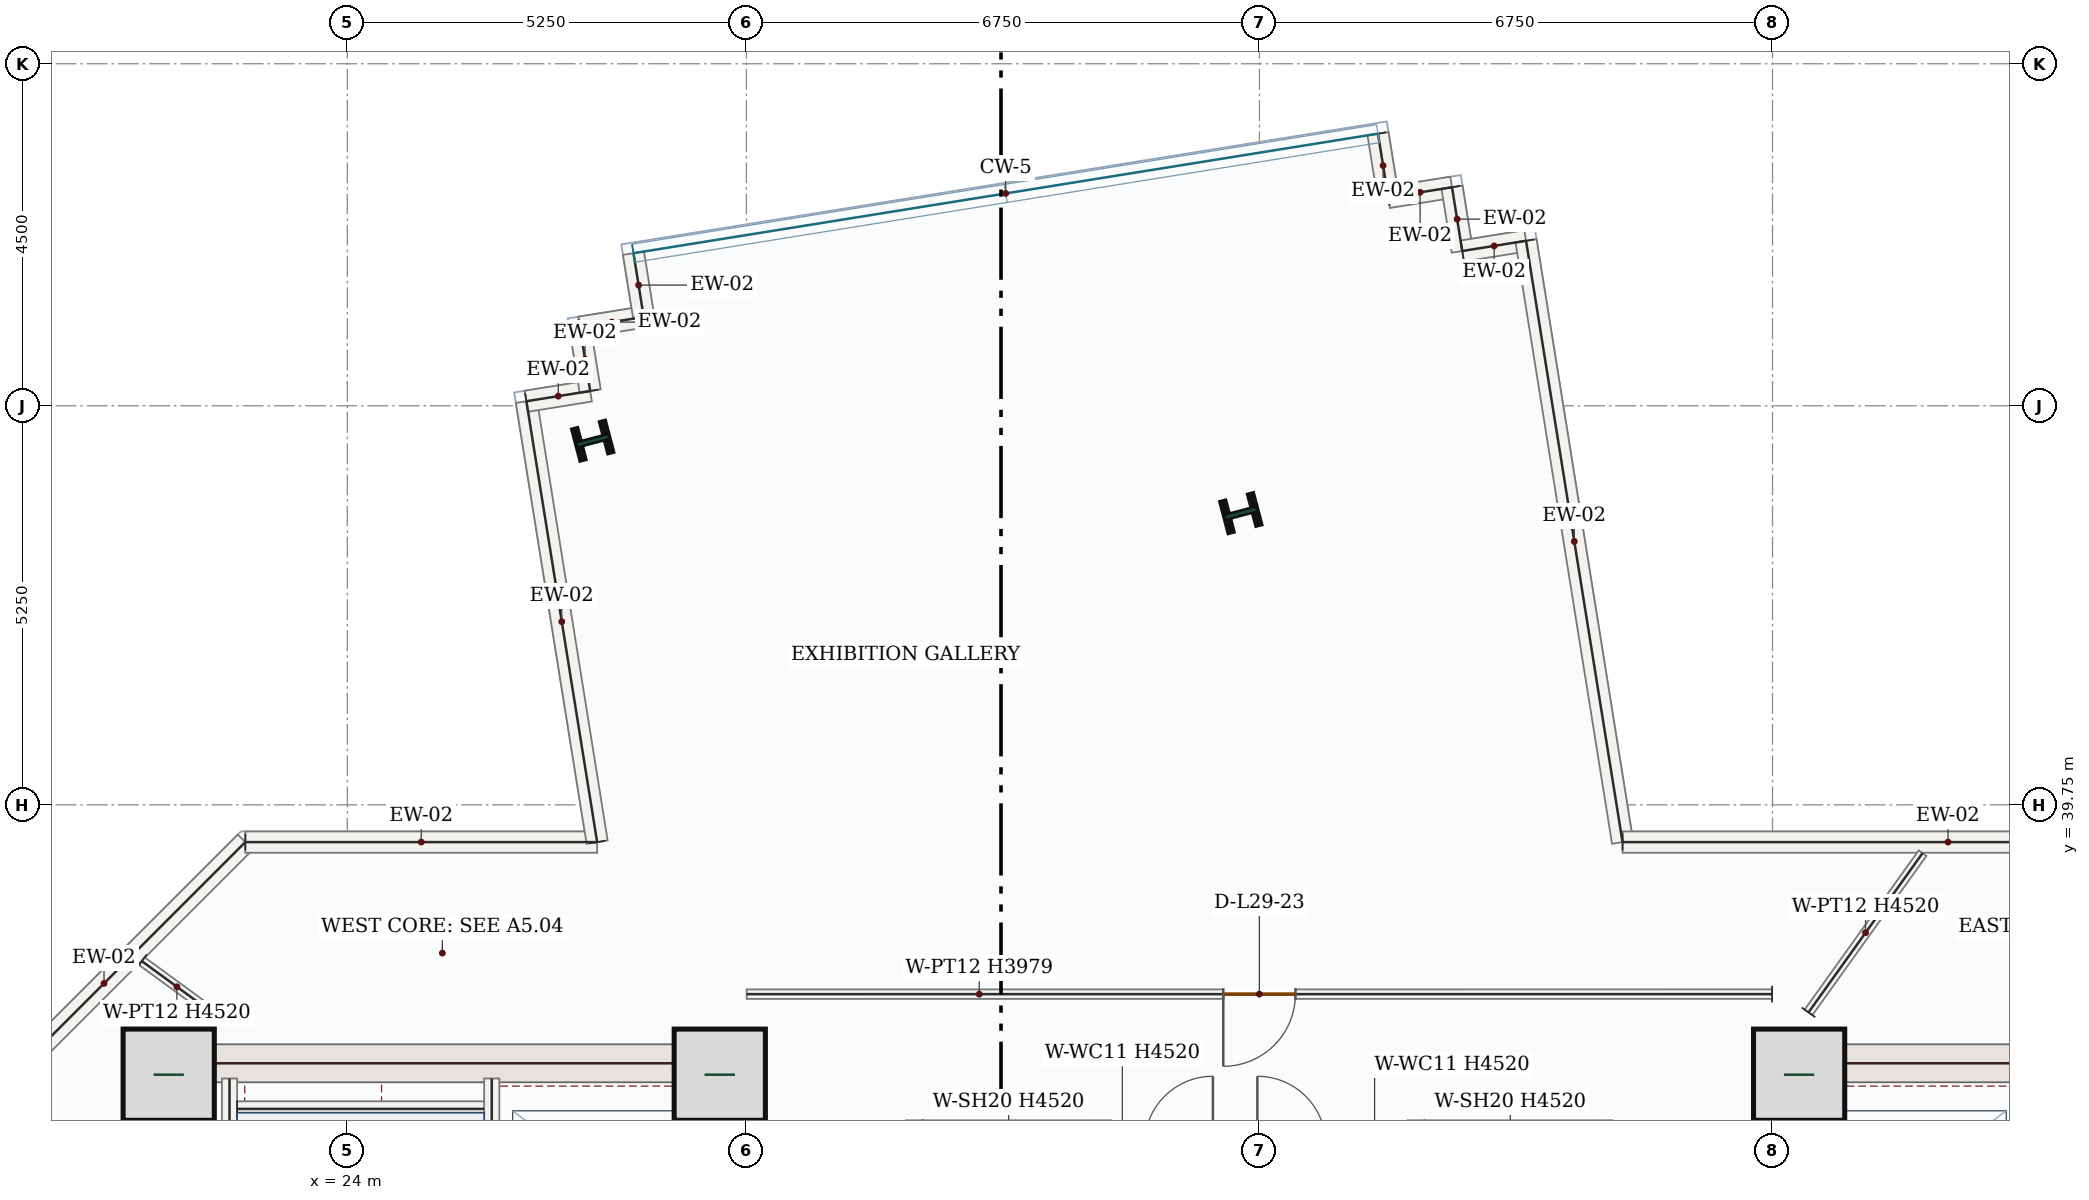
"""IFC4 building model, lengths in metres.
Left out: names, types, materials, properties, quantities, classifications, styles, units other than length and angle.
Written with IfcOpenShell. Run it as: python <this file> out.ifc"""

import sys

from ifc_helpers import new_model, si_unit, direction, frame, frame_2d, origin, origin_2d, place, context, subcontext, project, spatial, rectangle, i_section, extrude, source, transform, mapped, element, fill, save


model = new_model("IFC4")
c1 = context("Model", 3, precision=1e-05, world=origin(), true_north=direction((0.0, 1.0)))
c2 = subcontext(c1, "Body", "Model", "MODEL_VIEW")
j1 = project(units=[si_unit("LENGTHUNIT", "METRE"), si_unit("PLANEANGLEUNIT", "RADIAN")], contexts=[c1])
p1 = place(None, origin())
s1 = spatial("IfcSite", under=j1, at=p1, CompositionType="ELEMENT")
p2 = place(p1, origin())
s2 = spatial("IfcBuilding", under=s1, at=p2, CompositionType="ELEMENT")
p3 = place(p2, frame((0.0, 0.0, 130.8)))
s3 = spatial("IfcBuildingStorey", under=s2, at=p3, CompositionType="ELEMENT", Elevation=130.8)
m1 = source(origin(), c2, "Body", "SweptSolid", [
    extrude(rectangle(XDim=8.55, YDim=0.5, at=frame_2d((4.275, 0.0))), origin(), (0.0, 0.0, 1.0), 4.52),
])
p4 = place(p3, frame((21.5, 28.05, 0.0), z_axis=(0.0, 0.0, 1.0), x_axis=(0.0, 1.0, 0.0)))
e1 = element("IfcWall", 1, at=p4, inside=s3, PredefinedType="SHEAR", context=c2, shape_type="MappedRepresentation", body=[
    mapped(m1, transform((0.0, 0.0, 0.0), x_axis=(1.0, 0.0, 0.0), y_axis=(0.0, 1.0, 0.0), z_axis=(0.0, 0.0, 1.0), scale=1.0)),
])
p5 = place(p3, frame((29.0, 28.05, 0.0), z_axis=(0.0, 0.0, 1.0), x_axis=(0.0, 1.0, 0.0)))
e2 = element("IfcWall", 2, at=p5, inside=s3, PredefinedType="SHEAR", context=c2, shape_type="SweptSolid", body=[
    extrude(rectangle(XDim=8.55, YDim=0.5, at=frame_2d((4.275, 0.0))), origin(), (0.0, 0.0, 1.0), 4.52),
])
p6 = place(p5, frame((1.5, 0.0, 0.0)))
e3 = element("IfcOpeningElement", 3, at=p6, cuts=e2, PredefinedType="OPENING", context=c2, shape_type="SweptSolid", body=[
    extrude(rectangle(XDim=1.1, YDim=2.2, at=frame_2d((0.55, 1.1))), frame((0.0, 0.26, 0.0), z_axis=(0.0, -1.0, 0.0), x_axis=(1.0, 0.0, 0.0)), (0.0, 0.0, 1.0), 0.52),
])
m2 = source(origin(), c2, "Body", "SweptSolid", [
    extrude(rectangle(XDim=7.0, YDim=0.5, at=frame_2d((3.5, 0.0))), origin(), (0.0, 0.0, 1.0), 4.52),
])
p7 = place(p3, frame((21.75, 36.35, 0.0), z_axis=(0.0, 0.0, 1.0), x_axis=(1.0, 0.0, 0.0)))
e4 = element("IfcWall", 4, at=p7, inside=s3, PredefinedType="SHEAR", context=c2, shape_type="MappedRepresentation", body=[
    mapped(m2, transform((0.0, 0.0, 0.0), x_axis=(1.0, 0.0, 0.0), y_axis=(0.0, 1.0, 0.0), z_axis=(0.0, 0.0, 1.0), scale=1.0)),
])
p8 = place(p3, frame((43.0, 28.05, 0.0), z_axis=(0.0, 0.0, 1.0), x_axis=(0.0, 1.0, 0.0)))
e5 = element("IfcWall", 5, at=p8, inside=s3, PredefinedType="SHEAR", context=c2, shape_type="SweptSolid", body=[
    extrude(rectangle(XDim=8.55, YDim=0.5, at=frame_2d((4.275, 0.0))), origin(), (0.0, 0.0, 1.0), 4.52),
])
p9 = place(p8, frame((1.5, 0.0, 0.0)))
e6 = element("IfcOpeningElement", 6, at=p9, cuts=e5, PredefinedType="OPENING", context=c2, shape_type="SweptSolid", body=[
    extrude(rectangle(XDim=1.1, YDim=2.2, at=frame_2d((0.55, 1.1))), frame((0.0, 0.26, 0.0), z_axis=(0.0, -1.0, 0.0), x_axis=(1.0, 0.0, 0.0)), (0.0, 0.0, 1.0), 0.52),
])
p10 = place(p3, frame((43.25, 36.35, 0.0), z_axis=(0.0, 0.0, 1.0), x_axis=(1.0, 0.0, 0.0)))
e7 = element("IfcWall", 7, at=p10, inside=s3, PredefinedType="SHEAR", context=c2, shape_type="MappedRepresentation", body=[
    mapped(m2, transform((0.0, 0.0, 0.0), x_axis=(1.0, 0.0, 0.0), y_axis=(0.0, 1.0, 0.0), z_axis=(0.0, 0.0, 1.0), scale=1.0)),
])
m3 = source(origin(), c2, "Body", "SweptSolid", [
    extrude(rectangle(XDim=1.2, YDim=1.2, at=origin_2d()), origin(), (0.0, 0.0, 1.0), 4.8),
])
for number, where, z_axis, x_axis in (
    (8, (21.65, 36.2, 0.0), (0.0, 0.0, 1.0), (1.0, 0.0, 0.0)),
    (9, (28.9, 36.2, 0.0), (0.0, 0.0, 1.0), (1.0, 0.0, 0.0)),
    (10, (43.1, 36.2, 0.0), (0.0, 0.0, 1.0), (1.0, 0.0, 0.0)),
):
    element("IfcColumn", number, at=place(p3, frame(where, z_axis=z_axis, x_axis=x_axis)), inside=s3, PredefinedType="COLUMN", context=c2, shape_type="MappedRepresentation", body=[
        mapped(m3, transform((0.0, 0.0, 0.0), x_axis=(1.0, 0.0, 0.0), y_axis=(0.0, 1.0, 0.0), z_axis=(0.0, 0.0, 1.0), scale=1.0)),
    ])
m4 = source(origin(), c2, "Body", "SweptSolid", [
    extrude(i_section(OverallWidth=0.412, OverallDepth=0.435, WebThickness=0.036, FlangeThickness=0.057, FilletRadius=0.018, at=origin_2d()), origin(), (0.0, 0.0, 1.0), 4.8),
])
for number, where, z_axis, x_axis in (
    (11, (35.755, 43.588, 0.0), (0.0, 0.0, 1.0), (-0.255, 0.967, 0.0)),
    (12, (27.228, 44.541, 0.0), (0.0, 0.0, 1.0), (-0.255, 0.967, 0.0)),
):
    element("IfcColumn", number, at=place(p3, frame(where, z_axis=z_axis, x_axis=x_axis)), inside=s3, PredefinedType="COLUMN", context=c2, shape_type="MappedRepresentation", body=[
        mapped(m4, transform((0.0, 0.0, 0.0), x_axis=(1.0, 0.0, 0.0), y_axis=(0.0, 1.0, 0.0), z_axis=(0.0, 0.0, 1.0), scale=1.0)),
    ])
m5 = source(origin(), c2, "Body", "SweptSolid", [
    extrude(rectangle(XDim=5.258, YDim=0.28, at=frame_2d((2.629, 0.0))), origin(), (0.0, 0.0, 1.0), 4.52),
])
p11 = place(p3, frame((18.94, 35.542, 0.0), z_axis=(0.0, 0.0, 1.0), x_axis=(0.707106781187, 0.707106781187, 0.0)))
e13 = element("IfcWall", 13, at=p11, inside=s3, PredefinedType="SOLIDWALL", context=c2, shape_type="MappedRepresentation", body=[
    mapped(m5, transform((0.0, 0.0, 0.0), x_axis=(1.0, 0.0, 0.0), y_axis=(0.0, 1.0, 0.0), z_axis=(0.0, 0.0, 1.0), scale=1.0)),
])
m6 = source(origin(), c2, "Body", "SweptSolid", [
    extrude(rectangle(XDim=4.629, YDim=0.28, at=frame_2d((2.314, 0.0))), origin(), (0.0, 0.0, 1.0), 4.52),
])
p12 = place(p3, frame((22.658, 39.26, 0.0), z_axis=(0.0, 0.0, 1.0), x_axis=(1.0, 0.0, 0.0)))
e14 = element("IfcWall", 14, at=p12, inside=s3, PredefinedType="SOLIDWALL", context=c2, shape_type="MappedRepresentation", body=[
    mapped(m6, transform((0.0, 0.0, 0.0), x_axis=(1.0, 0.0, 0.0), y_axis=(0.0, 1.0, 0.0), z_axis=(0.0, 0.0, 1.0), scale=1.0)),
])
m7 = source(origin(), c2, "Body", "SweptSolid", [
    extrude(rectangle(XDim=5.874, YDim=0.28, at=frame_2d((2.937, 0.0))), origin(), (0.0, 0.0, 1.0), 4.52),
])
p13 = place(p3, frame((27.287, 39.26, 0.0), z_axis=(0.0, 0.0, 1.0), x_axis=(-0.158478405349, 0.987362443603, 0.0)))
e15 = element("IfcWall", 15, at=p13, inside=s3, PredefinedType="SOLIDWALL", context=c2, shape_type="MappedRepresentation", body=[
    mapped(m7, transform((0.0, 0.0, 0.0), x_axis=(1.0, 0.0, 0.0), y_axis=(0.0, 1.0, 0.0), z_axis=(0.0, 0.0, 1.0), scale=1.0)),
])
m8 = source(origin(), c2, "Body", "SweptSolid", [
    extrude(rectangle(XDim=0.85, YDim=0.28, at=frame_2d((0.425, 0.0))), origin(), (0.0, 0.0, 1.0), 4.52),
])
p14 = place(p3, frame((26.356, 45.06, 0.0), z_axis=(0.0, 0.0, 1.0), x_axis=(0.987392182174, 0.158293014948, 0.0)))
e16 = element("IfcWall", 16, at=p14, inside=s3, PredefinedType="SOLIDWALL", context=c2, shape_type="MappedRepresentation", body=[
    mapped(m8, transform((0.0, 0.0, 0.0), x_axis=(1.0, 0.0, 0.0), y_axis=(0.0, 1.0, 0.0), z_axis=(0.0, 0.0, 1.0), scale=1.0)),
])
m9 = source(origin(), c2, "Body", "SweptSolid", [
    extrude(rectangle(XDim=0.85, YDim=0.28, at=frame_2d((0.425, 0.0))), origin(), (0.0, 0.0, 1.0), 4.52),
])
for number, where, z_axis, x_axis in (
    (17, (27.195, 45.194, 0.0), (0.0, 0.0, 1.0), (-0.159, 0.987, 0.0)),
    (18, (27.06, 46.034, 0.0), (0.0, 0.0, 1.0), (0.987, 0.159, 0.0)),
):
    element("IfcWall", number, at=place(p3, frame(where, z_axis=z_axis, x_axis=x_axis)), inside=s3, PredefinedType="SOLIDWALL", context=c2, shape_type="MappedRepresentation", body=[
        mapped(m9, transform((0.0, 0.0, 0.0), x_axis=(1.0, 0.0, 0.0), y_axis=(0.0, 1.0, 0.0), z_axis=(0.0, 0.0, 1.0), scale=1.0)),
    ])
p15 = place(p3, frame((27.899, 46.168, 0.0), z_axis=(0.0, 0.0, 1.0), x_axis=(-0.15857308062, 0.98734724292, 0.0)))
e19 = element("IfcWall", 19, at=p15, inside=s3, PredefinedType="SOLIDWALL", context=c2, shape_type="MappedRepresentation", body=[
    mapped(m8, transform((0.0, 0.0, 0.0), x_axis=(1.0, 0.0, 0.0), y_axis=(0.0, 1.0, 0.0), z_axis=(0.0, 0.0, 1.0), scale=1.0)),
])
p16 = place(p3, frame((37.559, 48.58, 0.0), z_axis=(0.0, 0.0, 1.0), x_axis=(0.158528116284, -0.987354463376, 0.0)))
e20 = element("IfcWall", 20, at=p16, inside=s3, PredefinedType="SOLIDWALL", context=c2, shape_type="MappedRepresentation", body=[
    mapped(m9, transform((0.0, 0.0, 0.0), x_axis=(1.0, 0.0, 0.0), y_axis=(0.0, 1.0, 0.0), z_axis=(0.0, 0.0, 1.0), scale=1.0)),
])
p17 = place(p3, frame((37.694, 47.741, 0.0), z_axis=(0.0, 0.0, 1.0), x_axis=(0.98734724292, 0.15857308062, 0.0)))
e21 = element("IfcWall", 21, at=p17, inside=s3, PredefinedType="SOLIDWALL", context=c2, shape_type="MappedRepresentation", body=[
    mapped(m8, transform((0.0, 0.0, 0.0), x_axis=(1.0, 0.0, 0.0), y_axis=(0.0, 1.0, 0.0), z_axis=(0.0, 0.0, 1.0), scale=1.0)),
])
p18 = place(p3, frame((38.533, 47.875, 0.0), z_axis=(0.0, 0.0, 1.0), x_axis=(0.158528116284, -0.987354463376, 0.0)))
e22 = element("IfcWall", 22, at=p18, inside=s3, PredefinedType="SOLIDWALL", context=c2, shape_type="MappedRepresentation", body=[
    mapped(m9, transform((0.0, 0.0, 0.0), x_axis=(1.0, 0.0, 0.0), y_axis=(0.0, 1.0, 0.0), z_axis=(0.0, 0.0, 1.0), scale=1.0)),
])
p19 = place(p3, frame((38.668, 47.036, 0.0), z_axis=(0.0, 0.0, 1.0), x_axis=(0.98734724292, 0.15857308062, 0.0)))
e23 = element("IfcWall", 23, at=p19, inside=s3, PredefinedType="SOLIDWALL", context=c2, shape_type="MappedRepresentation", body=[
    mapped(m8, transform((0.0, 0.0, 0.0), x_axis=(1.0, 0.0, 0.0), y_axis=(0.0, 1.0, 0.0), z_axis=(0.0, 0.0, 1.0), scale=1.0)),
])
m10 = source(origin(), c2, "Body", "SweptSolid", [
    extrude(rectangle(XDim=8.012, YDim=0.28, at=frame_2d((4.006, 0.0))), origin(), (0.0, 0.0, 1.0), 4.52),
])
p20 = place(p3, frame((39.507, 47.171, 0.0), z_axis=(0.0, 0.0, 1.0), x_axis=(0.158511008443, -0.987357210032, 0.0)))
e24 = element("IfcWall", 24, at=p20, inside=s3, PredefinedType="SOLIDWALL", context=c2, shape_type="MappedRepresentation", body=[
    mapped(m10, transform((0.0, 0.0, 0.0), x_axis=(1.0, 0.0, 0.0), y_axis=(0.0, 1.0, 0.0), z_axis=(0.0, 0.0, 1.0), scale=1.0)),
])
m11 = source(origin(), c2, "Body", "SweptSolid", [
    extrude(rectangle(XDim=8.565, YDim=0.28, at=frame_2d((4.282, 0.0))), origin(), (0.0, 0.0, 1.0), 4.52),
])
p21 = place(p3, frame((40.777, 39.26, 0.0), z_axis=(0.0, 0.0, 1.0), x_axis=(1.0, 0.0, 0.0)))
e25 = element("IfcWall", 25, at=p21, inside=s3, PredefinedType="SOLIDWALL", context=c2, shape_type="MappedRepresentation", body=[
    mapped(m11, transform((0.0, 0.0, 0.0), x_axis=(1.0, 0.0, 0.0), y_axis=(0.0, 1.0, 0.0), z_axis=(0.0, 0.0, 1.0), scale=1.0)),
])
m12 = source(origin(), c2, "Body", "SweptSolid", [
    extrude(rectangle(XDim=7.87, YDim=0.2, at=frame_2d((3.935, 0.0))), origin(), (0.0, 0.0, 1.0), 4.52),
])
p22 = place(p3, frame((22.45, 28.28, 0.0), z_axis=(0.0, 0.0, 1.0), x_axis=(0.0, 1.0, 0.0)))
e26 = element("IfcWall", 26, at=p22, inside=s3, PredefinedType="SOLIDWALL", context=c2, shape_type="MappedRepresentation", body=[
    mapped(m12, transform((0.0, 0.0, 0.0), x_axis=(1.0, 0.0, 0.0), y_axis=(0.0, 1.0, 0.0), z_axis=(0.0, 0.0, 1.0), scale=1.0)),
])
p23 = place(p3, frame((25.9, 28.15, 0.0), z_axis=(0.0, 0.0, 1.0), x_axis=(0.0, 1.0, 0.0)))
e27 = element("IfcWall", 27, at=p23, inside=s3, PredefinedType="SOLIDWALL", context=c2, shape_type="SweptSolid", body=[
    extrude(rectangle(XDim=8.0, YDim=0.2, at=frame_2d((4.0, 0.0))), origin(), (0.0, 0.0, 1.0), 4.52),
])
p24 = place(p23, frame((0.4, 0.0, 0.0)))
e28 = element("IfcOpeningElement", 28, at=p24, cuts=e27, PredefinedType="OPENING", context=c2, shape_type="SweptSolid", body=[
    extrude(rectangle(XDim=1.05, YDim=2.15, at=frame_2d((0.525, 1.075))), frame((0.0, 0.11, 0.0), z_axis=(0.0, -1.0, 0.0), x_axis=(1.0, 0.0, 0.0)), (0.0, 0.0, 1.0), 0.22),
])
m13 = source(origin(), c2, "Body", "SweptSolid", [
    extrude(rectangle(XDim=3.25, YDim=0.2, at=frame_2d((1.625, 0.0))), origin(), (0.0, 0.0, 1.0), 4.52),
])
p25 = place(p3, frame((22.55, 35.75, 0.0), z_axis=(0.0, 0.0, 1.0), x_axis=(1.0, 0.0, 0.0)))
e29 = element("IfcWall", 29, at=p25, inside=s3, PredefinedType="SOLIDWALL", context=c2, shape_type="MappedRepresentation", body=[
    mapped(m13, transform((0.0, 0.0, 0.0), x_axis=(1.0, 0.0, 0.0), y_axis=(0.0, 1.0, 0.0), z_axis=(0.0, 0.0, 1.0), scale=1.0)),
])
p26 = place(p3, frame((31.45, 33.2, 0.0), z_axis=(0.0, 0.0, 1.0), x_axis=(0.0, 1.0, 0.0)))
e30 = element("IfcWall", 30, at=p26, inside=s3, PredefinedType="SOLIDWALL", context=c2, shape_type="SweptSolid", body=[
    extrude(rectangle(XDim=2.4, YDim=0.2, at=frame_2d((1.2, 0.0))), origin(), (0.0, 0.0, 1.0), 4.52),
])
p27 = place(p26, frame((0.65, 0.0, 0.0)))
e31 = element("IfcOpeningElement", 31, at=p27, cuts=e30, PredefinedType="OPENING", context=c2, shape_type="SweptSolid", body=[
    extrude(rectangle(XDim=1.1, YDim=2.15, at=frame_2d((0.55, 1.075))), frame((0.0, 0.11, 0.0), z_axis=(0.0, -1.0, 0.0), x_axis=(1.0, 0.0, 0.0)), (0.0, 0.0, 1.0), 0.22),
])
m14 = source(origin(), c2, "Body", "SweptSolid", [
    extrude(rectangle(XDim=2.4, YDim=0.2, at=frame_2d((1.2, 0.0))), origin(), (0.0, 0.0, 1.0), 4.52),
])
for number, where, z_axis, x_axis in (
    (32, (33.95, 33.2, 0.0), (0.0, 0.0, 1.0), (0.0, 1.0, 0.0)),
    (33, (38.05, 33.2, 0.0), (0.0, 0.0, 1.0), (0.0, 1.0, 0.0)),
):
    element("IfcWall", number, at=place(p3, frame(where, z_axis=z_axis, x_axis=x_axis)), inside=s3, PredefinedType="SOLIDWALL", context=c2, shape_type="MappedRepresentation", body=[
        mapped(m14, transform((0.0, 0.0, 0.0), x_axis=(1.0, 0.0, 0.0), y_axis=(0.0, 1.0, 0.0), z_axis=(0.0, 0.0, 1.0), scale=1.0)),
    ])
p28 = place(p3, frame((40.55, 33.2, 0.0), z_axis=(0.0, 0.0, 1.0), x_axis=(0.0, 1.0, 0.0)))
e34 = element("IfcWall", 34, at=p28, inside=s3, PredefinedType="SOLIDWALL", context=c2, shape_type="SweptSolid", body=[
    extrude(rectangle(XDim=2.4, YDim=0.2, at=frame_2d((1.2, 0.0))), origin(), (0.0, 0.0, 1.0), 4.52),
])
p29 = place(p28, frame((0.65, 0.0, 0.0)))
e35 = element("IfcOpeningElement", 35, at=p29, cuts=e34, PredefinedType="OPENING", context=c2, shape_type="SweptSolid", body=[
    extrude(rectangle(XDim=1.1, YDim=2.15, at=frame_2d((0.55, 1.075))), frame((0.0, 0.11, 0.0), z_axis=(0.0, -1.0, 0.0), x_axis=(1.0, 0.0, 0.0)), (0.0, 0.0, 1.0), 0.22),
])
m15 = source(origin(), c2, "Body", "SweptSolid", [
    extrude(rectangle(XDim=1.142, YDim=0.125, at=frame_2d((0.571, 0.0))), origin(), (0.0, 0.0, 1.0), 4.52),
])
p30 = place(p3, frame((21.297, 37.694, 0.0), z_axis=(0.0, 0.0, 1.0), x_axis=(0.807579073196, -0.589759307291, 0.0)))
e36 = element("IfcWall", 36, at=p30, inside=s3, PredefinedType="PARTITIONING", context=c2, shape_type="MappedRepresentation", body=[
    mapped(m15, transform((0.0, 0.0, 0.0), x_axis=(1.0, 0.0, 0.0), y_axis=(0.0, 1.0, 0.0), z_axis=(0.0, 0.0, 1.0), scale=1.0)),
])
m16 = source(origin(), c2, "Body", "SweptSolid", [
    extrude(rectangle(XDim=2.577, YDim=0.125, at=frame_2d((1.289, 0.0))), origin(), (0.0, 0.0, 1.0), 4.52),
])
p31 = place(p3, frame((43.224, 37.02, 0.0), z_axis=(0.0, 0.0, 1.0), x_axis=(0.582286278149, 0.812983819199, 0.0)))
e37 = element("IfcWall", 37, at=p31, inside=s3, PredefinedType="PARTITIONING", context=c2, shape_type="MappedRepresentation", body=[
    mapped(m16, transform((0.0, 0.0, 0.0), x_axis=(1.0, 0.0, 0.0), y_axis=(0.0, 1.0, 0.0), z_axis=(0.0, 0.0, 1.0), scale=1.0)),
])
p32 = place(p3, frame((42.744, 37.26, 0.0), z_axis=(0.0, 0.0, 1.0), x_axis=(-0.999999999345, -3.6194509e-05, 0.0)))
e38 = element("IfcWall", 38, at=p32, inside=s3, PredefinedType="PARTITIONING", context=c2, shape_type="SweptSolid", body=[
    extrude(rectangle(XDim=13.49, YDim=0.125, at=frame_2d((6.745, 0.0))), origin(), (0.0, 0.0, 1.0), 3.979),
])
p33 = place(p32, frame((6.27, 0.0, 0.0)))
e39 = element("IfcOpeningElement", 39, at=p33, cuts=e38, PredefinedType="OPENING", context=c2, shape_type="SweptSolid", body=[
    extrude(rectangle(XDim=0.95, YDim=2.15, at=frame_2d((0.475, 1.075))), frame((0.0, 0.073, 0.0), z_axis=(0.0, -1.0, 0.0), x_axis=(1.0, 0.0, 0.0)), (0.0, 0.0, 1.0), 0.145),
])
m17 = source(origin(), c2, "Body", "SweptSolid", [
    extrude(rectangle(XDim=0.95, YDim=2.15, at=frame_2d((0.475, 1.075))), frame((0.0, 0.025, 0.0), z_axis=(0.0, -1.0, 0.0), x_axis=(1.0, 0.0, 0.0)), (0.0, 0.0, 1.0), 0.05),
])
p34 = place(p33, origin())
e40 = element("IfcDoor", 40, at=p34, inside=s3, OperationType="SINGLE_SWING_RIGHT", PredefinedType="DOOR", context=c2, shape_type="MappedRepresentation", body=[
    mapped(m17, transform((0.0, 0.0, 0.0), x_axis=(1.0, 0.0, 0.0), y_axis=(0.0, 1.0, 0.0), z_axis=(0.0, 0.0, 1.0), scale=1.0)),
])
fill(e39, e40)
save(model, sys.argv[1])
